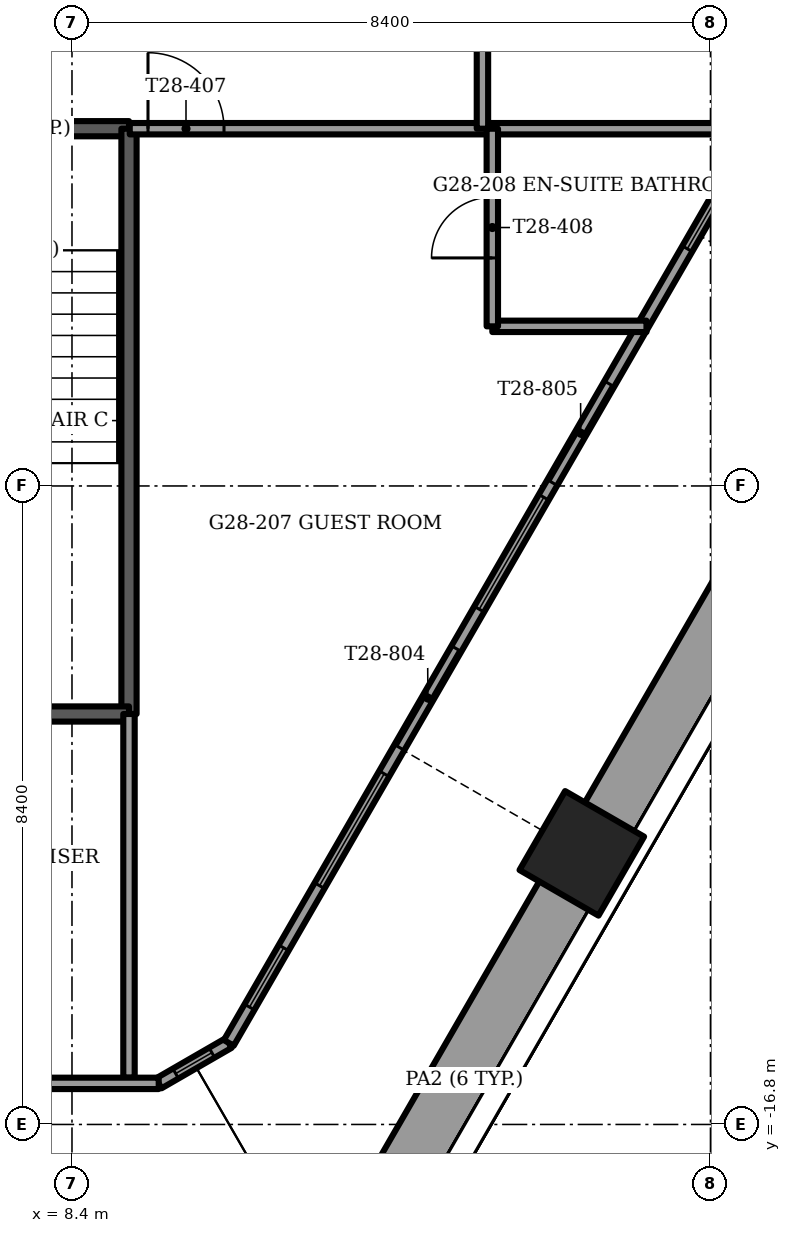
"""IFC4 building model, lengths in metres.
Left out: names, types, materials, properties, quantities, classifications, styles, units other than length and angle.
Written with IfcOpenShell. Run it as: python <this file> out.ifc"""

import sys

from ifc_helpers import new_model, si_unit, direction, frame, frame_2d, origin, origin_2d, place, context, subcontext, project, spatial, rectangle, extrude, element, fill, save


model = new_model("IFC4")
c1 = context("Model", 3, precision=1e-05, world=origin(), true_north=direction((0.0, 1.0)))
c2 = subcontext(c1, "Body", "Model", "MODEL_VIEW")
j1 = project(units=[si_unit("LENGTHUNIT", "METRE"), si_unit("PLANEANGLEUNIT", "RADIAN")], contexts=[c1])
p1 = place(None, origin())
s1 = spatial("IfcSite", under=j1, at=p1, CompositionType="ELEMENT")
p2 = place(p1, origin())
s2 = spatial("IfcBuilding", under=s1, at=p2, CompositionType="ELEMENT")
p3 = place(p2, frame((0.0, 0.0, 116.0)))
s3 = spatial("IfcBuildingStorey", under=s2, at=p3, CompositionType="ELEMENT", Elevation=116.0)
p4 = place(p3, frame((15.107, -13.233, -1.2), z_axis=(0.0, 0.0, 1.0), x_axis=(-0.5, -0.866025403784, 0.0)))
e1 = element("IfcColumn", 1, at=p4, inside=s3, PredefinedType="COLUMN", context=c2, shape_type="SweptSolid", body=[
    extrude(rectangle(XDim=1.2, YDim=1.2, at=origin_2d()), origin(), (0.0, 0.0, 1.0), 3.75),
])
p5 = place(p3, frame((12.17, -18.621, 0.0), z_axis=(0.0, 0.0, 1.0), x_axis=(0.500008568482, 0.866020456713, 0.0)))
e2 = element("IfcWall", 2, at=p5, inside=s3, PredefinedType="PARAPET", context=c2, shape_type="SweptSolid", body=[
    extrude(rectangle(XDim=5.564, YDim=0.9, at=frame_2d((2.782, 0.0))), origin(), (0.0, 0.0, 1.0), 1.1),
])
p6 = place(p3, frame((15.522, -12.815, 0.0), z_axis=(0.0, 0.0, 1.0), x_axis=(0.499999023957, 0.866025967302, 0.0)))
e3 = element("IfcWall", 3, at=p6, inside=s3, PredefinedType="PARAPET", context=c2, shape_type="SweptSolid", body=[
    extrude(rectangle(XDim=6.673, YDim=0.9, at=frame_2d((3.337, 0.0))), origin(), (0.0, 0.0, 1.0), 1.1),
])
p7 = place(p3, frame((-9.541, -16.26, 0.0), z_axis=(0.0, 0.0, 1.0), x_axis=(1.0, 0.0, 0.0)))
e4 = element("IfcWall", 4, at=p7, inside=s3, PredefinedType="SOLIDWALL", context=c2, shape_type="SweptSolid", body=[
    extrude(rectangle(XDim=19.082, YDim=0.15, at=frame_2d((9.541, 0.0))), origin(), (0.0, 0.0, 1.0), 3.45),
])
p8 = place(p7, frame((1.441, 0.0, 0.15)))
e5 = element("IfcOpeningElement", 5, at=p8, cuts=e4, PredefinedType="OPENING", context=c2, shape_type="SweptSolid", body=[
    extrude(rectangle(XDim=1.7, YDim=2.85, at=frame_2d((0.85, 1.425))), frame((0.0, 0.075, 0.0), z_axis=(0.0, -1.0, 0.0), x_axis=(1.0, 0.0, 0.0)), (0.0, 0.0, 1.0), 0.15),
])
p9 = place(p7, frame((5.691, 0.0, 0.15)))
e6 = element("IfcOpeningElement", 6, at=p9, cuts=e4, PredefinedType="OPENING", context=c2, shape_type="SweptSolid", body=[
    extrude(rectangle(XDim=0.9, YDim=2.85, at=frame_2d((0.45, 1.425))), frame((0.0, 0.075, 0.0), z_axis=(0.0, -1.0, 0.0), x_axis=(1.0, 0.0, 0.0)), (0.0, 0.0, 1.0), 0.15),
])
p10 = place(p7, frame((7.141, 0.0, 0.0)))
e7 = element("IfcOpeningElement", 7, at=p10, cuts=e4, PredefinedType="OPENING", context=c2, shape_type="SweptSolid", body=[
    extrude(rectangle(XDim=1.5, YDim=2.4, at=frame_2d((0.75, 1.2))), frame((0.0, 0.075, 0.0), z_axis=(0.0, -1.0, 0.0), x_axis=(1.0, 0.0, 0.0)), (0.0, 0.0, 1.0), 0.15),
])
p11 = place(p7, frame((9.891, 0.0, 0.15)))
e8 = element("IfcOpeningElement", 8, at=p11, cuts=e4, PredefinedType="OPENING", context=c2, shape_type="SweptSolid", body=[
    extrude(rectangle(XDim=1.7, YDim=2.85, at=frame_2d((0.85, 1.425))), frame((0.0, 0.075, 0.0), z_axis=(0.0, -1.0, 0.0), x_axis=(1.0, 0.0, 0.0)), (0.0, 0.0, 1.0), 0.15),
])
p12 = place(p7, frame((11.941, 0.0, 0.0)))
e9 = element("IfcOpeningElement", 9, at=p12, cuts=e4, PredefinedType="OPENING", context=c2, shape_type="SweptSolid", body=[
    extrude(rectangle(XDim=1.5, YDim=2.4, at=frame_2d((0.75, 1.2))), frame((0.0, 0.075, 0.0), z_axis=(0.0, -1.0, 0.0), x_axis=(1.0, 0.0, 0.0)), (0.0, 0.0, 1.0), 0.15),
])
p13 = place(p7, frame((15.691, 0.0, 0.15)))
e10 = element("IfcOpeningElement", 10, at=p13, cuts=e4, PredefinedType="OPENING", context=c2, shape_type="SweptSolid", body=[
    extrude(rectangle(XDim=1.7, YDim=2.85, at=frame_2d((0.85, 1.425))), frame((0.0, 0.075, 0.0), z_axis=(0.0, -1.0, 0.0), x_axis=(1.0, 0.0, 0.0)), (0.0, 0.0, 1.0), 0.15),
])
p14 = place(p3, frame((10.463, -15.727, 0.0), z_axis=(0.0, 0.0, 1.0), x_axis=(0.499992448691, 0.866029763491, 0.0)))
e11 = element("IfcWall", 11, at=p14, inside=s3, PredefinedType="SOLIDWALL", context=c2, shape_type="SweptSolid", body=[
    extrude(rectangle(XDim=16.777, YDim=0.15, at=frame_2d((8.388, 0.0))), origin(), (0.0, 0.0, 1.0), 3.45),
])
p15 = place(p14, frame((2.388, 0.0, 0.15)))
e12 = element("IfcOpeningElement", 12, at=p15, cuts=e11, PredefinedType="OPENING", context=c2, shape_type="SweptSolid", body=[
    extrude(rectangle(XDim=1.7, YDim=2.85, at=frame_2d((0.85, 1.425))), frame((0.0, 0.075, 0.0), z_axis=(0.0, -1.0, 0.0), x_axis=(1.0, 0.0, 0.0)), (0.0, 0.0, 1.0), 0.15),
])
p16 = place(p14, frame((4.488, 0.0, 0.0)))
e13 = element("IfcOpeningElement", 13, at=p16, cuts=e11, PredefinedType="OPENING", context=c2, shape_type="SweptSolid", body=[
    extrude(rectangle(XDim=1.5, YDim=2.4, at=frame_2d((0.75, 1.2))), frame((0.0, 0.075, 0.0), z_axis=(0.0, -1.0, 0.0), x_axis=(1.0, 0.0, 0.0)), (0.0, 0.0, 1.0), 0.15),
])
p17 = place(p14, frame((6.588, 0.0, 0.15)))
e14 = element("IfcOpeningElement", 14, at=p17, cuts=e11, PredefinedType="OPENING", context=c2, shape_type="SweptSolid", body=[
    extrude(rectangle(XDim=1.7, YDim=2.85, at=frame_2d((0.85, 1.425))), frame((0.0, 0.075, 0.0), z_axis=(0.0, -1.0, 0.0), x_axis=(1.0, 0.0, 0.0)), (0.0, 0.0, 1.0), 0.15),
])
p18 = place(p14, frame((8.511, 0.0, 0.0)))
e15 = element("IfcOpeningElement", 15, at=p18, cuts=e11, PredefinedType="OPENING", context=c2, shape_type="SweptSolid", body=[
    extrude(rectangle(XDim=1.5, YDim=2.4, at=frame_2d((0.75, 1.2))), frame((0.0, 0.075, 0.0), z_axis=(0.0, -1.0, 0.0), x_axis=(1.0, 0.0, 0.0)), (0.0, 0.0, 1.0), 0.15),
])
p19 = place(p14, frame((12.063, 0.0, 0.15)))
e16 = element("IfcOpeningElement", 16, at=p19, cuts=e11, PredefinedType="OPENING", context=c2, shape_type="SweptSolid", body=[
    extrude(rectangle(XDim=1.5, YDim=2.85, at=frame_2d((0.75, 1.425))), frame((0.0, 0.075, 0.0), z_axis=(0.0, -1.0, 0.0), x_axis=(1.0, 0.0, 0.0)), (0.0, 0.0, 1.0), 0.15),
])
p20 = place(p14, frame((0.544, 0.0, 0.15)))
e17 = element("IfcOpeningElement", 17, at=p20, cuts=e11, PredefinedType="OPENING", context=c2, shape_type="SweptSolid", body=[
    extrude(rectangle(XDim=0.9, YDim=2.73, at=frame_2d((0.45, 1.365))), frame((0.0, 0.075, 0.0), z_axis=(0.0, -1.0, 0.0), x_axis=(1.0, 0.0, 0.0)), (0.0, 0.0, 1.0), 0.15),
])
p21 = place(p14, frame((15.333, 0.0, 0.15)))
e18 = element("IfcOpeningElement", 18, at=p21, cuts=e11, PredefinedType="OPENING", context=c2, shape_type="SweptSolid", body=[
    extrude(rectangle(XDim=0.9, YDim=2.73, at=frame_2d((0.45, 1.365))), frame((0.0, 0.075, 0.0), z_axis=(0.0, -1.0, 0.0), x_axis=(1.0, 0.0, 0.0)), (0.0, 0.0, 1.0), 0.15),
])
p22 = place(p3, frame((9.541, -16.26, 0.0), z_axis=(0.0, 0.0, 1.0), x_axis=(0.866048165231, 0.499960573946, 0.0)))
e19 = element("IfcWall", 19, at=p22, inside=s3, PredefinedType="SOLIDWALL", context=c2, shape_type="SweptSolid", body=[
    extrude(rectangle(XDim=1.065, YDim=0.15, at=frame_2d((0.532, 0.0))), origin(), (0.0, 0.0, 1.0), 3.45),
])
p23 = place(p22, frame((0.258, 0.0, 0.15)))
e20 = element("IfcOpeningElement", 20, at=p23, cuts=e19, PredefinedType="OPENING", context=c2, shape_type="SweptSolid", body=[
    extrude(rectangle(XDim=0.55, YDim=2.85, at=frame_2d((0.275, 1.425))), frame((0.0, 0.075, 0.0), z_axis=(0.0, -1.0, 0.0), x_axis=(1.0, 0.0, 0.0)), (0.0, 0.0, 1.0), 0.15),
])
p24 = place(p3, frame((5.8, -3.7, -0.3), z_axis=(0.0, 0.0, 1.0), x_axis=(1.0, 0.0, 0.0)))
e21 = element("IfcWall", 21, at=p24, inside=s3, PredefinedType="SOLIDWALL", context=c2, shape_type="SweptSolid", body=[
    extrude(rectangle(XDim=3.35, YDim=0.2, at=frame_2d((1.675, 0.0))), origin(), (0.0, 0.0, 1.0), 3.75),
])
p25 = place(p24, frame((1.125, 0.0, 0.0)))
e22 = element("IfcOpeningElement", 22, at=p25, cuts=e21, PredefinedType="OPENING", context=c2, shape_type="SweptSolid", body=[
    extrude(rectangle(XDim=1.1, YDim=2.1, at=frame_2d((0.55, 1.05))), frame((0.0, 0.1, 0.0), z_axis=(0.0, -1.0, 0.0), x_axis=(1.0, 0.0, 0.0)), (0.0, 0.0, 1.0), 0.2),
])
p26 = place(p3, frame((9.15, -3.7, -0.3), z_axis=(0.0, 0.0, 1.0), x_axis=(0.0, -1.0, 0.0)))
e23 = element("IfcWall", 23, at=p26, inside=s3, PredefinedType="SOLIDWALL", context=c2, shape_type="SweptSolid", body=[
    extrude(rectangle(XDim=7.7, YDim=0.2, at=frame_2d((3.85, 0.0))), origin(), (0.0, 0.0, 1.0), 3.75),
])
p27 = place(p3, frame((5.8, -11.4, -0.3), z_axis=(0.0, 0.0, 1.0), x_axis=(1.0, 0.0, 0.0)))
e24 = element("IfcWall", 24, at=p27, inside=s3, PredefinedType="SOLIDWALL", context=c2, shape_type="SweptSolid", body=[
    extrude(rectangle(XDim=3.35, YDim=0.2, at=frame_2d((1.675, 0.0))), origin(), (0.0, 0.0, 1.0), 3.75),
])
p28 = place(p3, frame((9.15, -11.4, 0.0), z_axis=(0.0, 0.0, 1.0), x_axis=(0.0, -1.0, 0.0)))
e25 = element("IfcWall", 25, at=p28, inside=s3, PredefinedType="PARTITIONING", context=c2, shape_type="SweptSolid", body=[
    extrude(rectangle(XDim=4.785, YDim=0.15, at=frame_2d((2.392, 0.0))), origin(), (0.0, 0.0, 1.0), 3.45),
])
p29 = place(p3, frame((13.93, -6.3, 0.0), z_axis=(0.0, 0.0, 1.0), x_axis=(1.0, 0.0, 0.0)))
e26 = element("IfcWall", 26, at=p29, inside=s3, PredefinedType="PARTITIONING", context=c2, shape_type="SweptSolid", body=[
    extrude(rectangle(XDim=2.028, YDim=0.15, at=frame_2d((1.014, 0.0))), origin(), (0.0, 0.0, 1.0), 3.45),
])
p30 = place(p3, frame((9.16, -3.7, 0.0), z_axis=(0.0, 0.0, 1.0), x_axis=(1.0, 0.0, 0.0)))
e27 = element("IfcWall", 27, at=p30, inside=s3, PredefinedType="PARTITIONING", context=c2, shape_type="SweptSolid", body=[
    extrude(rectangle(XDim=8.299, YDim=0.15, at=frame_2d((4.149, 0.0))), origin(), (0.0, 0.0, 1.0), 3.45),
])
p31 = place(p30, frame((0.24, 0.0, 0.0)))
e28 = element("IfcOpeningElement", 28, at=p31, cuts=e27, PredefinedType="OPENING", context=c2, shape_type="SweptSolid", body=[
    extrude(rectangle(XDim=1.0, YDim=2.1, at=frame_2d((0.5, 1.05))), frame((0.0, 0.075, 0.0), z_axis=(0.0, -1.0, 0.0), x_axis=(1.0, 0.0, 0.0)), (0.0, 0.0, 1.0), 0.15),
])
p32 = place(p3, frame((13.93, -6.3, 0.0), z_axis=(0.0, 0.0, 1.0), x_axis=(0.0, 1.0, 0.0)))
e29 = element("IfcWall", 29, at=p32, inside=s3, PredefinedType="PARTITIONING", context=c2, shape_type="SweptSolid", body=[
    extrude(rectangle(XDim=2.6, YDim=0.15, at=frame_2d((1.3, 0.0))), origin(), (0.0, 0.0, 1.0), 3.45),
])
p33 = place(p32, frame((0.9, 0.0, 0.0)))
e30 = element("IfcOpeningElement", 30, at=p33, cuts=e29, PredefinedType="OPENING", context=c2, shape_type="SweptSolid", body=[
    extrude(rectangle(XDim=0.8, YDim=2.1, at=frame_2d((0.4, 1.05))), frame((0.0, 0.075, 0.0), z_axis=(0.0, -1.0, 0.0), x_axis=(1.0, 0.0, 0.0)), (0.0, 0.0, 1.0), 0.15),
])
p34 = place(p3, frame((13.8, -3.7, 0.0), z_axis=(0.0, 0.0, 1.0), x_axis=(0.0, 1.0, 0.0)))
e31 = element("IfcWall", 31, at=p34, inside=s3, PredefinedType="PARTITIONING", context=c2, shape_type="SweptSolid", body=[
    extrude(rectangle(XDim=12.407, YDim=0.15, at=frame_2d((6.204, 0.0))), origin(), (0.0, 0.0, 1.0), 3.45),
])
p35 = place(p34, frame((1.6, 0.0, 0.0)))
e32 = element("IfcOpeningElement", 32, at=p35, cuts=e31, PredefinedType="OPENING", context=c2, shape_type="SweptSolid", body=[
    extrude(rectangle(XDim=1.0, YDim=2.1, at=frame_2d((0.5, 1.05))), frame((0.0, 0.075, 0.0), z_axis=(0.0, -1.0, 0.0), x_axis=(1.0, 0.0, 0.0)), (0.0, 0.0, 1.0), 0.15),
])
p36 = place(p34, frame((7.683, 0.0, 0.0)))
e33 = element("IfcOpeningElement", 33, at=p36, cuts=e31, PredefinedType="OPENING", context=c2, shape_type="SweptSolid", body=[
    extrude(rectangle(XDim=1.0, YDim=2.1, at=frame_2d((0.5, 1.05))), frame((0.0, 0.075, 0.0), z_axis=(0.0, -1.0, 0.0), x_axis=(1.0, 0.0, 0.0)), (0.0, 0.0, 1.0), 0.15),
])
p37 = place(p15, origin())
e34 = element("IfcWindow", 34, at=p37, inside=s3, PartitioningType="SINGLE_PANEL", PredefinedType="WINDOW", context=c2, shape_type="SweptSolid", body=[
    extrude(rectangle(XDim=1.7, YDim=2.85, at=frame_2d((0.85, 1.425))), frame((0.0, 0.03, 0.0), z_axis=(0.0, -1.0, 0.0), x_axis=(1.0, 0.0, 0.0)), (0.0, 0.0, 1.0), 0.06),
])
fill(e12, e34)
p38 = place(p16, origin())
e35 = element("IfcDoor", 35, at=p38, inside=s3, OperationType="SLIDING_TO_LEFT", PredefinedType="DOOR", context=c2, shape_type="SweptSolid", body=[
    extrude(rectangle(XDim=1.5, YDim=2.4, at=frame_2d((0.75, 1.2))), frame((0.0, 0.025, 0.0), z_axis=(0.0, -1.0, 0.0), x_axis=(1.0, 0.0, 0.0)), (0.0, 0.0, 1.0), 0.05),
])
fill(e13, e35)
p39 = place(p17, origin())
e36 = element("IfcWindow", 36, at=p39, inside=s3, PartitioningType="SINGLE_PANEL", PredefinedType="WINDOW", context=c2, shape_type="SweptSolid", body=[
    extrude(rectangle(XDim=1.7, YDim=2.85, at=frame_2d((0.85, 1.425))), frame((0.0, 0.03, 0.0), z_axis=(0.0, -1.0, 0.0), x_axis=(1.0, 0.0, 0.0)), (0.0, 0.0, 1.0), 0.06),
])
fill(e14, e36)
p40 = place(p18, origin())
e37 = element("IfcDoor", 37, at=p40, inside=s3, OperationType="SLIDING_TO_RIGHT", PredefinedType="DOOR", context=c2, shape_type="SweptSolid", body=[
    extrude(rectangle(XDim=1.5, YDim=2.4, at=frame_2d((0.75, 1.2))), frame((0.0, 0.025, 0.0), z_axis=(0.0, -1.0, 0.0), x_axis=(1.0, 0.0, 0.0)), (0.0, 0.0, 1.0), 0.05),
])
fill(e15, e37)
p41 = place(p19, origin())
e38 = element("IfcWindow", 38, at=p41, inside=s3, PartitioningType="SINGLE_PANEL", PredefinedType="WINDOW", context=c2, shape_type="SweptSolid", body=[
    extrude(rectangle(XDim=1.5, YDim=2.85, at=frame_2d((0.75, 1.425))), frame((0.0, 0.03, 0.0), z_axis=(0.0, -1.0, 0.0), x_axis=(1.0, 0.0, 0.0)), (0.0, 0.0, 1.0), 0.06),
])
fill(e16, e38)
p42 = place(p20, origin())
e39 = element("IfcWindow", 39, at=p42, inside=s3, PartitioningType="SINGLE_PANEL", PredefinedType="WINDOW", context=c2, shape_type="SweptSolid", body=[
    extrude(rectangle(XDim=0.9, YDim=2.73, at=frame_2d((0.45, 1.365))), frame((0.0, 0.03, 0.0), z_axis=(0.0, -1.0, 0.0), x_axis=(1.0, 0.0, 0.0)), (0.0, 0.0, 1.0), 0.06),
])
fill(e17, e39)
p43 = place(p23, origin())
e40 = element("IfcWindow", 40, at=p43, inside=s3, PartitioningType="SINGLE_PANEL", PredefinedType="WINDOW", context=c2, shape_type="SweptSolid", body=[
    extrude(rectangle(XDim=0.55, YDim=2.85, at=frame_2d((0.275, 1.425))), frame((0.0, 0.03, 0.0), z_axis=(0.0, -1.0, 0.0), x_axis=(1.0, 0.0, 0.0)), (0.0, 0.0, 1.0), 0.06),
])
fill(e20, e40)
p44 = place(p31, origin())
e41 = element("IfcDoor", 41, at=p44, inside=s3, OperationType="SINGLE_SWING_LEFT", PredefinedType="DOOR", context=c2, shape_type="SweptSolid", body=[
    extrude(rectangle(XDim=1.0, YDim=2.1, at=frame_2d((0.5, 1.05))), frame((0.0, 0.025, 0.0), z_axis=(0.0, -1.0, 0.0), x_axis=(1.0, 0.0, 0.0)), (0.0, 0.0, 1.0), 0.05),
])
fill(e28, e41)
p45 = place(p33, origin())
e42 = element("IfcDoor", 42, at=p45, inside=s3, OperationType="SINGLE_SWING_RIGHT", PredefinedType="DOOR", context=c2, shape_type="SweptSolid", body=[
    extrude(rectangle(XDim=0.8, YDim=2.1, at=frame_2d((0.4, 1.05))), frame((0.0, 0.025, 0.0), z_axis=(0.0, -1.0, 0.0), x_axis=(1.0, 0.0, 0.0)), (0.0, 0.0, 1.0), 0.05),
])
fill(e30, e42)
save(model, sys.argv[1])
